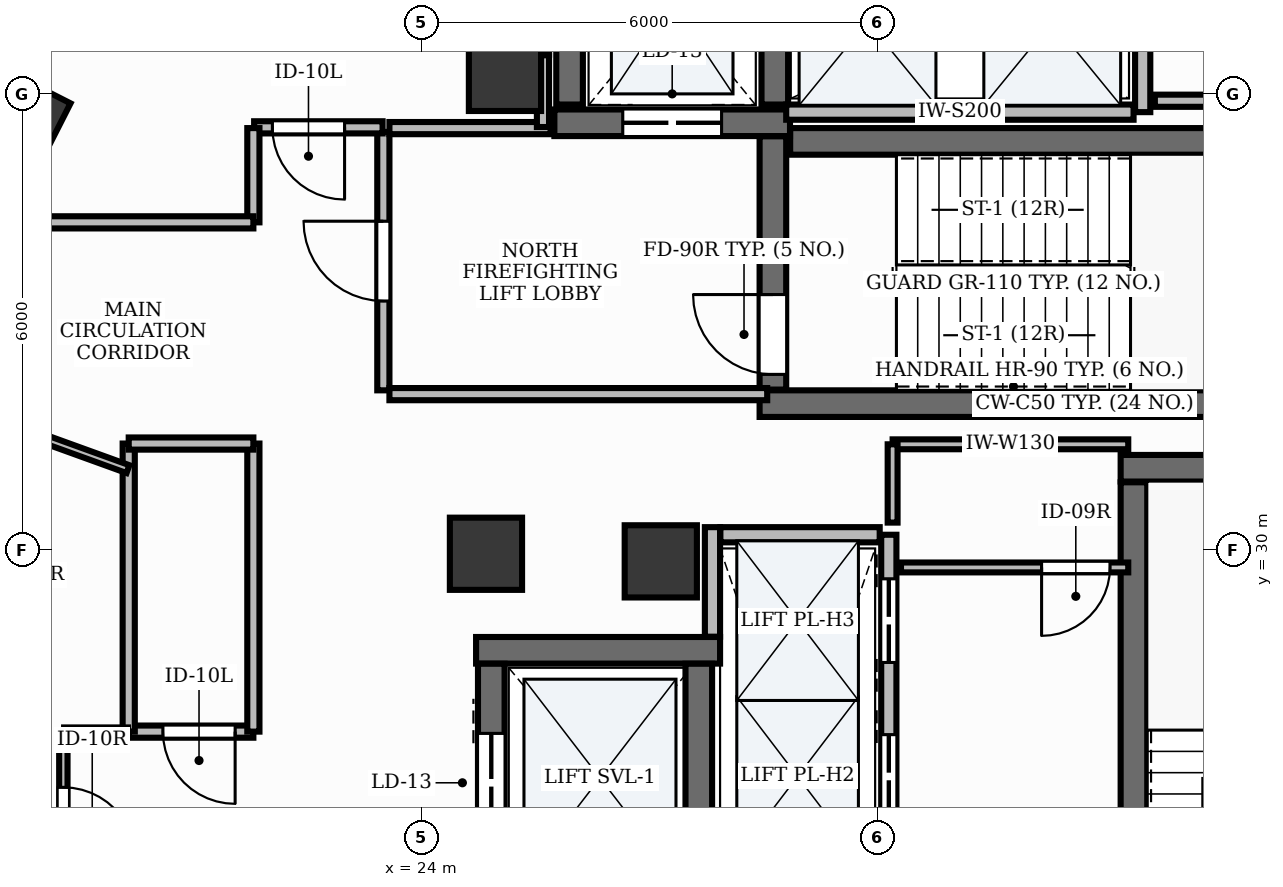
"""IFC4 building model, lengths in metres.
Left out: names, types, materials, properties, quantities, classifications, styles, units other than length and angle.
Written with IfcOpenShell. Run it as: python <this file> out.ifc"""

import sys

from ifc_helpers import new_model, si_unit, direction, frame, frame_2d, origin, origin_2d, place, context, subcontext, project, spatial, rectangle, extrude, element, fill, save


model = new_model("IFC4")
c1 = context("Model", 3, precision=1e-05, world=origin(), true_north=direction((0.0, 1.0)))
c2 = subcontext(c1, "Body", "Model", "MODEL_VIEW")
j1 = project(units=[si_unit("LENGTHUNIT", "METRE"), si_unit("PLANEANGLEUNIT", "RADIAN")], contexts=[c1])
p1 = place(None, origin())
s1 = spatial("IfcSite", under=j1, at=p1, CompositionType="ELEMENT")
p2 = place(p1, origin())
s2 = spatial("IfcBuilding", under=s1, at=p2, CompositionType="ELEMENT")
p3 = place(p2, frame((0.0, 0.0, 327.0)))
s3 = spatial("IfcBuildingStorey", under=s2, at=p3, CompositionType="ELEMENT", Elevation=327.0)
p4 = place(p3, frame((28.852, 35.375, 0.0), z_axis=(0.0, 0.0, 1.0), x_axis=(1.0, 0.0, 0.0)))
e1 = element("IfcWall", 1, at=p4, inside=s3, PredefinedType="SHEAR", context=c2, shape_type="SweptSolid", body=[
    extrude(rectangle(XDim=8.148, YDim=0.35, at=frame_2d((4.074, 0.0))), origin(), (0.0, 0.0, 1.0), 3.9),
])
p5 = place(p3, frame((28.45, 31.925, 0.0), z_axis=(0.0, 0.0, 1.0), x_axis=(1.0, 0.0, 0.0)))
e2 = element("IfcWall", 2, at=p5, inside=s3, PredefinedType="SHEAR", context=c2, shape_type="SweptSolid", body=[
    extrude(rectangle(XDim=8.55, YDim=0.35, at=frame_2d((4.275, 0.0))), origin(), (0.0, 0.0, 1.0), 3.9),
])
p6 = place(p3, frame((28.625, 32.11, 0.0), z_axis=(0.0, 0.0, 1.0), x_axis=(0.0, 1.0, 0.0)))
e3 = element("IfcWall", 3, at=p6, inside=s3, PredefinedType="SHEAR", context=c2, shape_type="SweptSolid", body=[
    extrude(rectangle(XDim=3.333, YDim=0.35, at=frame_2d((1.667, 0.0))), origin(), (0.0, 0.0, 1.0), 3.9),
])
p7 = place(p6, frame((0.2, 0.0, 0.0)))
e4 = element("IfcOpeningElement", 4, at=p7, cuts=e3, PredefinedType="OPENING", context=c2, shape_type="SweptSolid", body=[
    extrude(rectangle(XDim=1.05, YDim=2.15, at=frame_2d((0.525, 1.075))), frame((0.0, 0.19, 0.0), z_axis=(0.0, -1.0, 0.0), x_axis=(1.0, 0.0, 0.0)), (0.0, 0.0, 1.0), 0.38),
])
p8 = place(p3, frame((33.2, 31.075, 0.0), z_axis=(0.0, 0.0, 1.0), x_axis=(1.0, 0.0, 0.0)))
e5 = element("IfcWall", 5, at=p8, inside=s3, PredefinedType="SHEAR", context=c2, shape_type="SweptSolid", body=[
    extrude(rectangle(XDim=3.8, YDim=0.35, at=frame_2d((1.9, 0.0))), origin(), (0.0, 0.0, 1.0), 3.9),
])
p9 = place(p3, frame((33.375, 23.11, 0.0), z_axis=(0.0, 0.0, 1.0), x_axis=(0.0, 1.0, 0.0)))
e6 = element("IfcWall", 6, at=p9, inside=s3, PredefinedType="SHEAR", context=c2, shape_type="SweptSolid", body=[
    extrude(rectangle(XDim=7.78, YDim=0.35, at=frame_2d((3.89, 0.0))), origin(), (0.0, 0.0, 1.0), 3.9),
])
p10 = place(p9, frame((0.2, 0.0, 0.0)))
e7 = element("IfcOpeningElement", 7, at=p10, cuts=e6, PredefinedType="OPENING", context=c2, shape_type="SweptSolid", body=[
    extrude(rectangle(XDim=1.05, YDim=2.15, at=frame_2d((0.525, 1.075))), frame((0.0, 0.19, 0.0), z_axis=(0.0, -1.0, 0.0), x_axis=(1.0, 0.0, 0.0)), (0.0, 0.0, 1.0), 0.38),
])
p11 = place(p3, frame((25.75, 35.62, 0.0), z_axis=(0.0, 0.0, 1.0), x_axis=(1.0, 0.0, 0.0)))
e8 = element("IfcWall", 8, at=p11, inside=s3, PredefinedType="SHEAR", context=c2, shape_type="SweptSolid", body=[
    extrude(rectangle(XDim=3.1, YDim=0.35, at=frame_2d((1.55, 0.0))), origin(), (0.0, 0.0, 1.0), 3.9),
])
p12 = place(p11, frame((0.9, 0.0, 0.0)))
e9 = element("IfcOpeningElement", 9, at=p12, cuts=e8, PredefinedType="OPENING", context=c2, shape_type="SweptSolid", body=[
    extrude(rectangle(XDim=1.3, YDim=2.2, at=frame_2d((0.65, 1.1))), frame((0.0, 0.19, 0.0), z_axis=(0.0, -1.0, 0.0), x_axis=(1.0, 0.0, 0.0)), (0.0, 0.0, 1.0), 0.38),
])
for number, where, z_axis, x_axis in (
    (10, (25.95, 35.86, 0.0), (0.0, 0.0, 1.0), (0.0, 1.0, 0.0)),
    (11, (28.65, 35.86, 0.0), (0.0, 0.0, 1.0), (0.0, 1.0, 0.0)),
):
    element("IfcWall", number, at=place(p3, frame(where, z_axis=z_axis, x_axis=x_axis)), inside=s3, PredefinedType="SHEAR", context=c2, shape_type="SweptSolid", body=[
        extrude(rectangle(XDim=2.7, YDim=0.35, at=frame_2d((1.35, 0.0))), origin(), (0.0, 0.0, 1.0), 3.9),
    ])
p13 = place(p3, frame((24.72, 28.68, 0.0), z_axis=(0.0, 0.0, 1.0), x_axis=(1.0, 0.0, 0.0)))
e12 = element("IfcWall", 12, at=p13, inside=s3, PredefinedType="SHEAR", context=c2, shape_type="SweptSolid", body=[
    extrude(rectangle(XDim=3.21, YDim=0.35, at=frame_2d((1.605, 0.0))), origin(), (0.0, 0.0, 1.0), 3.9),
])
p14 = place(p3, frame((24.92, 25.497, 0.0), z_axis=(0.0, 0.0, 1.0), x_axis=(0.0, 1.0, 0.0)))
e13 = element("IfcWall", 13, at=p14, inside=s3, PredefinedType="SHEAR", context=c2, shape_type="SweptSolid", body=[
    extrude(rectangle(XDim=3.006, YDim=0.35, at=frame_2d((1.503, 0.0))), origin(), (0.0, 0.0, 1.0), 3.9),
])
p15 = place(p14, frame((0.79, 0.0, 0.0)))
e14 = element("IfcOpeningElement", 14, at=p15, cuts=e13, PredefinedType="OPENING", context=c2, shape_type="SweptSolid", body=[
    extrude(rectangle(XDim=1.3, YDim=2.2, at=frame_2d((0.65, 1.1))), frame((0.0, 0.19, 0.0), z_axis=(0.0, -1.0, 0.0), x_axis=(1.0, 0.0, 0.0)), (0.0, 0.0, 1.0), 0.38),
])
p16 = place(p3, frame((27.65, 25.497, 0.0), z_axis=(0.0, 0.0, 1.0), x_axis=(0.0, 1.0, 0.0)))
e15 = element("IfcWall", 15, at=p16, inside=s3, PredefinedType="SHEAR", context=c2, shape_type="SweptSolid", body=[
    extrude(rectangle(XDim=3.006, YDim=0.35, at=frame_2d((1.503, 0.0))), origin(), (0.0, 0.0, 1.0), 3.9),
])
for number, where, z_axis, x_axis in (
    (16, (25.1, 36.25, -0.0), (0.0, 0.0, 1.0), (1.0, 0.0, 0.0)),
    (17, (24.85, 29.95, -0.0), (0.0, 0.0, 1.0), (1.0, 0.0, 0.0)),
    (18, (27.15, 29.85, -0.0), (0.0, 0.0, 1.0), (1.0, 0.0, 0.0)),
):
    element("IfcColumn", number, at=place(p3, frame(where, z_axis=z_axis, x_axis=x_axis)), inside=s3, PredefinedType="PILASTER", context=c2, shape_type="SweptSolid", body=[
        extrude(rectangle(XDim=0.95, YDim=0.95, at=origin_2d()), origin(), (0.0, 0.0, 1.0), 3.901),
    ])
p17 = place(p3, frame((18.914, 35.723, -0.0), z_axis=(0.0, 0.0, 1.0), x_axis=(0.453057191132, 0.891481453292, 0.0)))
e19 = element("IfcColumn", 19, at=p17, inside=s3, PredefinedType="COLUMN", context=c2, shape_type="SweptSolid", body=[
    extrude(rectangle(XDim=0.7, YDim=0.7, at=origin_2d()), origin(), (0.0, 0.0, 1.0), 3.901),
])
p18 = place(p3, frame((27.83, 28.859, 0.0), z_axis=(0.0, 0.0, 1.0), x_axis=(0.0, 1.0, 0.0)))
e20 = element("IfcWall", 20, at=p18, inside=s3, PredefinedType="PARTITIONING", context=c2, shape_type="SweptSolid", body=[
    extrude(rectangle(XDim=1.441, YDim=0.2, at=frame_2d((0.721, 0.0))), origin(), (0.0, 0.0, 1.0), 2.22),
])
p19 = place(p3, frame((30.15, 23.85, 0.0), z_axis=(0.0, 0.0, 1.0), x_axis=(0.0, 1.0, 0.0)))
e21 = element("IfcWall", 21, at=p19, inside=s3, PredefinedType="PARTITIONING", context=c2, shape_type="SweptSolid", body=[
    extrude(rectangle(XDim=6.35, YDim=0.2, at=frame_2d((3.175, 0.0))), origin(), (0.0, 0.0, 1.0), 2.22),
])
p20 = place(p19, frame((0.58, 0.0, 0.0)))
e22 = element("IfcOpeningElement", 22, at=p20, cuts=e21, PredefinedType="OPENING", context=c2, shape_type="SweptSolid", body=[
    extrude(rectangle(XDim=1.1, YDim=2.2, at=frame_2d((0.55, 1.1))), frame((0.0, 0.115, 0.0), z_axis=(0.0, -1.0, 0.0), x_axis=(1.0, 0.0, 0.0)), (0.0, 0.0, 1.0), 0.23),
])
p21 = place(p19, frame((2.62, 0.0, 0.0)))
e23 = element("IfcOpeningElement", 23, at=p21, cuts=e21, PredefinedType="OPENING", context=c2, shape_type="SweptSolid", body=[
    extrude(rectangle(XDim=1.1, YDim=2.2, at=frame_2d((0.55, 1.1))), frame((0.0, 0.115, 0.0), z_axis=(0.0, -1.0, 0.0), x_axis=(1.0, 0.0, 0.0)), (0.0, 0.0, 1.0), 0.23),
])
p22 = place(p19, frame((4.67, 0.0, 0.0)))
e24 = element("IfcOpeningElement", 24, at=p22, cuts=e21, PredefinedType="OPENING", context=c2, shape_type="SweptSolid", body=[
    extrude(rectangle(XDim=1.1, YDim=2.2, at=frame_2d((0.55, 1.1))), frame((0.0, 0.115, 0.0), z_axis=(0.0, -1.0, 0.0), x_axis=(1.0, 0.0, 0.0)), (0.0, 0.0, 1.0), 0.23),
])
p23 = place(p3, frame((27.934, 30.2, 0.0), z_axis=(0.0, 0.0, 1.0), x_axis=(1.0, 0.0, 0.0)))
e25 = element("IfcWall", 25, at=p23, inside=s3, PredefinedType="PARTITIONING", context=c2, shape_type="SweptSolid", body=[
    extrude(rectangle(XDim=2.096, YDim=0.2, at=frame_2d((1.048, 0.0))), origin(), (0.0, 0.0, 1.0), 2.22),
])
p24 = place(p3, frame((33.49, 35.76, 0.0), z_axis=(0.0, 0.0, 1.0), x_axis=(0.0, 1.0, 0.0)))
e26 = element("IfcWall", 26, at=p24, inside=s3, PredefinedType="PARTITIONING", context=c2, shape_type="SweptSolid", body=[
    extrude(rectangle(XDim=2.38, YDim=0.2, at=frame_2d((1.19, 0.0))), origin(), (0.0, 0.0, 1.0), 2.22),
])
p25 = place(p3, frame((28.8, 35.76, 0.0), z_axis=(0.0, 0.0, 1.0), x_axis=(1.0, 0.0, 0.0)))
e27 = element("IfcWall", 27, at=p25, inside=s3, PredefinedType="PARTITIONING", context=c2, shape_type="SweptSolid", body=[
    extrude(rectangle(XDim=4.57, YDim=0.2, at=frame_2d((2.285, 0.0))), origin(), (0.0, 0.0, 1.0), 2.22),
])
p26 = place(p3, frame((23.5, 32.1, 0.0), z_axis=(0.0, 0.0, 1.0), x_axis=(0.0, 1.0, 0.0)))
e28 = element("IfcWall", 28, at=p26, inside=s3, PredefinedType="PARTITIONING", context=c2, shape_type="SweptSolid", body=[
    extrude(rectangle(XDim=3.4, YDim=0.16, at=frame_2d((1.7, 0.0))), origin(), (0.0, 0.0, 1.0), 2.22),
])
p27 = place(p26, frame((1.175, 0.0, 0.0)))
e29 = element("IfcOpeningElement", 29, at=p27, cuts=e28, PredefinedType="OPENING", context=c2, shape_type="SweptSolid", body=[
    extrude(rectangle(XDim=1.05, YDim=2.15, at=frame_2d((0.525, 1.075))), frame((0.0, 0.095, 0.0), z_axis=(0.0, -1.0, 0.0), x_axis=(1.0, 0.0, 0.0)), (0.0, 0.0, 1.0), 0.19),
])
p28 = place(p3, frame((23.58, 32.05, 0.0), z_axis=(0.0, 0.0, 1.0), x_axis=(1.0, 0.0, 0.0)))
e30 = element("IfcWall", 30, at=p28, inside=s3, PredefinedType="PARTITIONING", context=c2, shape_type="SweptSolid", body=[
    extrude(rectangle(XDim=4.97, YDim=0.16, at=frame_2d((2.485, 0.0))), origin(), (0.0, 0.0, 1.0), 2.22),
])
p29 = place(p3, frame((23.58, 35.55, 0.0), z_axis=(0.0, 0.0, 1.0), x_axis=(1.0, 0.0, 0.0)))
e31 = element("IfcWall", 31, at=p29, inside=s3, PredefinedType="PARTITIONING", context=c2, shape_type="SweptSolid", body=[
    extrude(rectangle(XDim=2.12, YDim=0.16, at=frame_2d((1.06, 0.0))), origin(), (0.0, 0.0, 1.0), 2.22),
])
p30 = place(p3, frame((33.3, 29.77, 0.0), z_axis=(0.0, 0.0, 1.0), x_axis=(-1.0, 0.0, 0.0)))
e32 = element("IfcWall", 32, at=p30, inside=s3, PredefinedType="PARTITIONING", context=c2, shape_type="SweptSolid", body=[
    extrude(rectangle(XDim=2.99, YDim=0.13, at=frame_2d((1.495, 0.0))), origin(), (0.0, 0.0, 1.0), 2.22),
])
p31 = place(p30, frame((0.24, 0.0, 0.0)))
e33 = element("IfcOpeningElement", 33, at=p31, cuts=e32, PredefinedType="OPENING", context=c2, shape_type="SweptSolid", body=[
    extrude(rectangle(XDim=0.9, YDim=2.15, at=frame_2d((0.45, 1.075))), frame((0.0, 0.08, 0.0), z_axis=(0.0, -1.0, 0.0), x_axis=(1.0, 0.0, 0.0)), (0.0, 0.0, 1.0), 0.16),
])
p32 = place(p3, frame((21.79, 27.61, 0.0), z_axis=(0.0, 0.0, 1.0), x_axis=(-1.0, 0.0, 0.0)))
e34 = element("IfcWall", 34, at=p32, inside=s3, PredefinedType="PARTITIONING", context=c2, shape_type="SweptSolid", body=[
    extrude(rectangle(XDim=1.64, YDim=0.16, at=frame_2d((0.82, 0.0))), origin(), (0.0, 0.0, 1.0), 2.22),
])
p33 = place(p32, frame((0.24, 0.0, 0.0)))
e35 = element("IfcOpeningElement", 35, at=p33, cuts=e34, PredefinedType="OPENING", context=c2, shape_type="SweptSolid", body=[
    extrude(rectangle(XDim=0.95, YDim=2.15, at=frame_2d((0.475, 1.075))), frame((0.0, 0.095, 0.0), z_axis=(0.0, -1.0, 0.0), x_axis=(1.0, 0.0, 0.0)), (0.0, 0.0, 1.0), 0.19),
])
p34 = place(p3, frame((19.29, 27.6, 0.0), z_axis=(0.0, 0.0, 1.0), x_axis=(0.0, -1.0, 0.0)))
e36 = element("IfcWall", 36, at=p34, inside=s3, PredefinedType="MOVABLE", context=c2, shape_type="SweptSolid", body=[
    extrude(rectangle(XDim=2.097, YDim=0.11, at=frame_2d((1.049, 0.0))), origin(), (0.0, 0.0, 1.0), 2.22),
])
p35 = place(p34, frame((0.723, 0.0, 0.0)))
e37 = element("IfcOpeningElement", 37, at=p35, cuts=e36, PredefinedType="OPENING", context=c2, shape_type="SweptSolid", body=[
    extrude(rectangle(XDim=0.95, YDim=2.15, at=frame_2d((0.475, 1.075))), frame((0.0, 0.07, 0.0), z_axis=(0.0, -1.0, 0.0), x_axis=(1.0, 0.0, 0.0)), (0.0, 0.0, 1.0), 0.14),
])
p36 = place(p3, frame((23.49, 35.56, 0.0), z_axis=(0.0, 0.0, 1.0), x_axis=(-1.0, 0.0, 0.0)))
e38 = element("IfcWall", 38, at=p36, inside=s3, PredefinedType="PARTITIONING", context=c2, shape_type="SweptSolid", body=[
    extrude(rectangle(XDim=1.69, YDim=0.16, at=frame_2d((0.845, 0.0))), origin(), (0.0, 0.0, 1.0), 2.22),
])
p37 = place(p36, frame((0.5, 0.0, 0.0)))
e39 = element("IfcOpeningElement", 39, at=p37, cuts=e38, PredefinedType="OPENING", context=c2, shape_type="SweptSolid", body=[
    extrude(rectangle(XDim=0.95, YDim=2.15, at=frame_2d((0.475, 1.075))), frame((0.0, 0.095, 0.0), z_axis=(0.0, -1.0, 0.0), x_axis=(1.0, 0.0, 0.0)), (0.0, 0.0, 1.0), 0.19),
])
p38 = place(p3, frame((30.2, 31.39, 0.0), z_axis=(0.0, 0.0, 1.0), x_axis=(1.0, 0.0, 0.0)))
e40 = element("IfcWall", 40, at=p38, inside=s3, PredefinedType="PARTITIONING", context=c2, shape_type="SweptSolid", body=[
    extrude(rectangle(XDim=3.1, YDim=0.13, at=frame_2d((1.55, 0.0))), origin(), (0.0, 0.0, 1.0), 2.22),
])
p39 = place(p3, frame((30.2, 30.36, 0.0), z_axis=(0.0, 0.0, 1.0), x_axis=(0.0, 1.0, 0.0)))
e41 = element("IfcWall", 41, at=p39, inside=s3, PredefinedType="PARTITIONING", context=c2, shape_type="SweptSolid", body=[
    extrude(rectangle(XDim=1.03, YDim=0.13, at=frame_2d((0.515, 0.0))), origin(), (0.0, 0.0, 1.0), 2.22),
])
for number, where, z_axis, x_axis in (
    (42, (21.79, 31.4, 0.0), (0.0, 0.0, 1.0), (0.0, -1.0, 0.0)),
    (43, (20.15, 27.61, 0.0), (0.0, 0.0, 1.0), (0.0, 1.0, 0.0)),
):
    element("IfcWall", number, at=place(p3, frame(where, z_axis=z_axis, x_axis=x_axis)), inside=s3, PredefinedType="PARTITIONING", context=c2, shape_type="SweptSolid", body=[
        extrude(rectangle(XDim=3.79, YDim=0.16, at=frame_2d((1.895, 0.0))), origin(), (0.0, 0.0, 1.0), 2.22),
    ])
p40 = place(p3, frame((20.15, 31.4, 0.0), z_axis=(0.0, 0.0, 1.0), x_axis=(1.0, 0.0, 0.0)))
e44 = element("IfcWall", 44, at=p40, inside=s3, PredefinedType="PARTITIONING", context=c2, shape_type="SweptSolid", body=[
    extrude(rectangle(XDim=1.64, YDim=0.16, at=frame_2d((0.82, 0.0))), origin(), (0.0, 0.0, 1.0), 2.22),
])
p41 = place(p3, frame((18.961, 31.49, 0.0), z_axis=(0.0, 0.0, 1.0), x_axis=(0.94035502025, -0.340194702915, 0.0)))
e45 = element("IfcWall", 45, at=p41, inside=s3, PredefinedType="MOVABLE", context=c2, shape_type="SweptSolid", body=[
    extrude(rectangle(XDim=1.254, YDim=0.11, at=frame_2d((0.627, 0.0))), origin(), (0.0, 0.0, 1.0), 2.22),
])
p42 = place(p3, frame((20.14, 27.61, 0.0), z_axis=(0.0, 0.0, 1.0), x_axis=(-1.0, 0.0, 0.0)))
e46 = element("IfcWall", 46, at=p42, inside=s3, PredefinedType="MOVABLE", context=c2, shape_type="SweptSolid", body=[
    extrude(rectangle(XDim=0.84, YDim=0.11, at=frame_2d((0.42, 0.0))), origin(), (0.0, 0.0, 1.0), 2.22),
])
p43 = place(p3, frame((37.35, 35.91, 0.0), z_axis=(0.0, 0.0, 1.0), x_axis=(-1.0, 0.0, 0.0)))
e47 = element("IfcWall", 47, at=p43, inside=s3, PredefinedType="PARTITIONING", context=c2, shape_type="SweptSolid", body=[
    extrude(rectangle(XDim=3.7, YDim=0.16, at=frame_2d((1.85, 0.0))), origin(), (0.0, 0.0, 1.0), 2.22),
])
p44 = place(p3, frame((25.6, 39.376, 0.0), z_axis=(0.0, 0.0, 1.0), x_axis=(0.0, -1.0, 0.0)))
e48 = element("IfcWall", 48, at=p44, inside=s3, PredefinedType="PARTITIONING", context=c2, shape_type="SweptSolid", body=[
    extrude(rectangle(XDim=2.86, YDim=0.16, at=frame_2d((1.43, 0.0))), origin(), (0.0, 0.0, 1.0), 2.22),
])
p45 = place(p3, frame((25.6, 36.508, 0.0), z_axis=(0.0, 0.0, 1.0), x_axis=(0.0, -1.0, 0.0)))
e49 = element("IfcWall", 49, at=p45, inside=s3, PredefinedType="PARTITIONING", context=c2, shape_type="SweptSolid", body=[
    extrude(rectangle(XDim=0.943, YDim=0.16, at=frame_2d((0.472, 0.0))), origin(), (0.0, 0.0, 1.0), 2.22),
])
p46 = place(p3, frame((21.79, 35.55, 0.0), z_axis=(0.0, 0.0, 1.0), x_axis=(0.0, -1.0, 0.0)))
e50 = element("IfcWall", 50, at=p46, inside=s3, PredefinedType="PARTITIONING", context=c2, shape_type="SweptSolid", body=[
    extrude(rectangle(XDim=1.24, YDim=0.16, at=frame_2d((0.62, 0.0))), origin(), (0.0, 0.0, 1.0), 2.22),
])
p47 = place(p3, frame((21.79, 34.31, 0.0), z_axis=(0.0, 0.0, 1.0), x_axis=(-1.0, 0.0, 0.0)))
e51 = element("IfcWall", 51, at=p47, inside=s3, PredefinedType="PARTITIONING", context=c2, shape_type="SweptSolid", body=[
    extrude(rectangle(XDim=3.19, YDim=0.16, at=frame_2d((1.595, 0.0))), origin(), (0.0, 0.0, 1.0), 2.22),
])
p48 = place(p7, origin())
e52 = element("IfcDoor", 52, at=p48, inside=s3, OperationType="SINGLE_SWING_RIGHT", PredefinedType="DOOR", context=c2, shape_type="SweptSolid", body=[
    extrude(rectangle(XDim=1.05, YDim=2.15, at=frame_2d((0.525, 1.075))), frame((0.0, 0.025, 0.0), z_axis=(0.0, -1.0, 0.0), x_axis=(1.0, 0.0, 0.0)), (0.0, 0.0, 1.0), 0.05),
])
fill(e4, e52)
p49 = place(p21, origin())
e53 = element("IfcDoor", 53, at=p49, inside=s3, OperationType="DOUBLE_DOOR_SLIDING", PredefinedType="DOOR", context=c2, shape_type="SweptSolid", body=[
    extrude(rectangle(XDim=1.1, YDim=2.2, at=frame_2d((0.55, 1.1))), frame((0.0, 0.025, 0.0), z_axis=(0.0, -1.0, 0.0), x_axis=(1.0, 0.0, 0.0)), (0.0, 0.0, 1.0), 0.05),
])
fill(e23, e53)
p50 = place(p22, origin())
e54 = element("IfcDoor", 54, at=p50, inside=s3, OperationType="DOUBLE_DOOR_SLIDING", PredefinedType="DOOR", context=c2, shape_type="SweptSolid", body=[
    extrude(rectangle(XDim=1.1, YDim=2.2, at=frame_2d((0.55, 1.1))), frame((0.0, 0.025, 0.0), z_axis=(0.0, -1.0, 0.0), x_axis=(1.0, 0.0, 0.0)), (0.0, 0.0, 1.0), 0.05),
])
fill(e24, e54)
p51 = place(p12, origin())
e55 = element("IfcDoor", 55, at=p51, inside=s3, OperationType="DOUBLE_DOOR_SLIDING", PredefinedType="DOOR", context=c2, shape_type="SweptSolid", body=[
    extrude(rectangle(XDim=1.3, YDim=2.2, at=frame_2d((0.65, 1.1))), frame((0.0, 0.025, 0.0), z_axis=(0.0, -1.0, 0.0), x_axis=(1.0, 0.0, 0.0)), (0.0, 0.0, 1.0), 0.05),
])
fill(e9, e55)
p52 = place(p15, origin())
e56 = element("IfcDoor", 56, at=p52, inside=s3, OperationType="DOUBLE_DOOR_SLIDING", PredefinedType="DOOR", context=c2, shape_type="SweptSolid", body=[
    extrude(rectangle(XDim=1.3, YDim=2.2, at=frame_2d((0.65, 1.1))), frame((0.0, 0.025, 0.0), z_axis=(0.0, -1.0, 0.0), x_axis=(1.0, 0.0, 0.0)), (0.0, 0.0, 1.0), 0.05),
])
fill(e14, e56)
p53 = place(p27, origin())
e57 = element("IfcDoor", 57, at=p53, inside=s3, OperationType="SINGLE_SWING_RIGHT", PredefinedType="DOOR", context=c2, shape_type="SweptSolid", body=[
    extrude(rectangle(XDim=1.05, YDim=2.15, at=frame_2d((0.525, 1.075))), frame((0.0, 0.025, 0.0), z_axis=(0.0, -1.0, 0.0), x_axis=(1.0, 0.0, 0.0)), (0.0, 0.0, 1.0), 0.05),
])
fill(e29, e57)
p54 = place(p31, origin())
e58 = element("IfcDoor", 58, at=p54, inside=s3, OperationType="SINGLE_SWING_RIGHT", PredefinedType="DOOR", context=c2, shape_type="SweptSolid", body=[
    extrude(rectangle(XDim=0.9, YDim=2.15, at=frame_2d((0.45, 1.075))), frame((0.0, 0.025, 0.0), z_axis=(0.0, -1.0, 0.0), x_axis=(1.0, 0.0, 0.0)), (0.0, 0.0, 1.0), 0.05),
])
fill(e33, e58)
p55 = place(p33, origin())
e59 = element("IfcDoor", 59, at=p55, inside=s3, OperationType="SINGLE_SWING_LEFT", PredefinedType="DOOR", context=c2, shape_type="SweptSolid", body=[
    extrude(rectangle(XDim=0.95, YDim=2.15, at=frame_2d((0.475, 1.075))), frame((0.0, 0.025, 0.0), z_axis=(0.0, -1.0, 0.0), x_axis=(1.0, 0.0, 0.0)), (0.0, 0.0, 1.0), 0.05),
])
fill(e35, e59)
p56 = place(p35, origin())
e60 = element("IfcDoor", 60, at=p56, inside=s3, OperationType="SINGLE_SWING_RIGHT", PredefinedType="DOOR", context=c2, shape_type="SweptSolid", body=[
    extrude(rectangle(XDim=0.95, YDim=2.15, at=frame_2d((0.475, 1.075))), frame((0.0, 0.025, 0.0), z_axis=(0.0, -1.0, 0.0), x_axis=(1.0, 0.0, 0.0)), (0.0, 0.0, 1.0), 0.05),
])
fill(e37, e60)
p57 = place(p37, origin())
e61 = element("IfcDoor", 61, at=p57, inside=s3, OperationType="SINGLE_SWING_LEFT", PredefinedType="DOOR", context=c2, shape_type="SweptSolid", body=[
    extrude(rectangle(XDim=0.95, YDim=2.15, at=frame_2d((0.475, 1.075))), frame((0.0, 0.025, 0.0), z_axis=(0.0, -1.0, 0.0), x_axis=(1.0, 0.0, 0.0)), (0.0, 0.0, 1.0), 0.05),
])
fill(e39, e61)
save(model, sys.argv[1])
